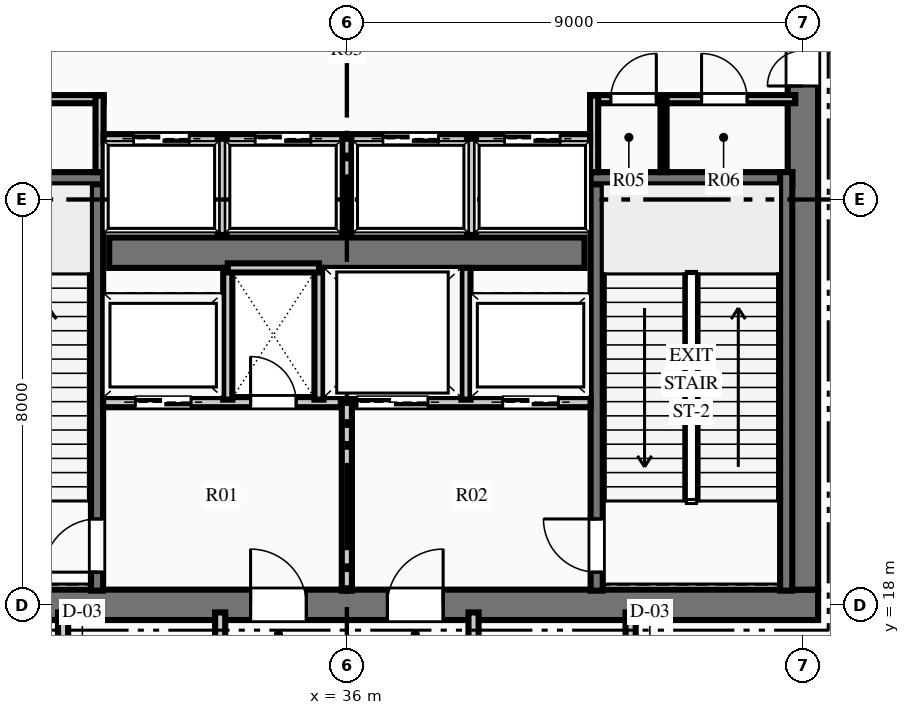
"""IFC4 building model, lengths in metres.
Left out: names, types, materials, properties, quantities, classifications, styles, units other than length and angle.
Written with IfcOpenShell. Run it as: python <this file> out.ifc"""

import sys

from ifc_helpers import new_model, si_unit, direction, frame, frame_2d, origin, place, context, subcontext, project, spatial, rectangle, extrude, element, fill, save


model = new_model("IFC4")
c1 = context("Model", 3, precision=1e-05, world=origin(), true_north=direction((0.0, 1.0)))
c2 = subcontext(c1, "Body", "Model", "MODEL_VIEW")
j1 = project(units=[si_unit("LENGTHUNIT", "METRE"), si_unit("PLANEANGLEUNIT", "RADIAN")], contexts=[c1])
p1 = place(None, origin())
s1 = spatial("IfcSite", under=j1, at=p1, CompositionType="ELEMENT")
p2 = place(p1, origin())
s2 = spatial("IfcBuilding", under=s1, at=p2, CompositionType="ELEMENT")
p3 = place(p2, origin())
s3 = spatial("IfcBuildingStorey", under=s2, at=p3, CompositionType="ELEMENT", Elevation=0.0)
p4 = place(p3, frame((26.7, 18.0, 0.0), z_axis=(0.0, 0.0, 1.0), x_axis=(1.0, 0.0, 0.0)))
e1 = element("IfcWall", 1, at=p4, inside=s3, PredefinedType="SHEAR", context=c2, shape_type="SweptSolid", body=[
    extrude(rectangle(XDim=18.6, YDim=0.6, at=frame_2d((9.3, 0.0))), origin(), (0.0, 0.0, 1.0), 6.0),
])
p5 = place(p4, frame((7.4, 0.0, 0.0)))
e2 = element("IfcOpeningElement", 2, at=p5, cuts=e1, PredefinedType="OPENING", context=c2, shape_type="SweptSolid", body=[
    extrude(rectangle(XDim=1.1, YDim=2.15, at=frame_2d((0.55, 1.075))), frame((0.0, 0.31, 0.0), z_axis=(0.0, -1.0, 0.0), x_axis=(1.0, 0.0, 0.0)), (0.0, 0.0, 1.0), 0.62),
])
p6 = place(p4, frame((10.1, 0.0, 0.0)))
e3 = element("IfcOpeningElement", 3, at=p6, cuts=e1, PredefinedType="OPENING", context=c2, shape_type="SweptSolid", body=[
    extrude(rectangle(XDim=1.1, YDim=2.15, at=frame_2d((0.55, 1.075))), frame((0.0, 0.31, 0.0), z_axis=(0.0, -1.0, 0.0), x_axis=(1.0, 0.0, 0.0)), (0.0, 0.0, 1.0), 0.62),
])
p7 = place(p3, frame((45.0, 18.3, 0.0), z_axis=(0.0, 0.0, 1.0), x_axis=(0.0, 1.0, 0.0)))
e4 = element("IfcWall", 4, at=p7, inside=s3, PredefinedType="SHEAR", context=c2, shape_type="SweptSolid", body=[
    extrude(rectangle(XDim=15.4, YDim=0.6, at=frame_2d((7.7, 0.0))), origin(), (0.0, 0.0, 1.0), 6.0),
])
p8 = place(p7, frame((9.94, 0.0, 0.0)))
e5 = element("IfcOpeningElement", 5, at=p8, cuts=e4, PredefinedType="OPENING", context=c2, shape_type="SweptSolid", body=[
    extrude(rectangle(XDim=1.4, YDim=2.2, at=frame_2d((0.7, 1.1))), frame((0.0, 0.31, 0.0), z_axis=(0.0, -1.0, 0.0), x_axis=(1.0, 0.0, 0.0)), (0.0, 0.0, 1.0), 0.62),
])
p9 = place(p3, frame((31.31, 24.95, 0.0), z_axis=(0.0, 0.0, 1.0), x_axis=(1.0, 0.0, 0.0)))
e6 = element("IfcWall", 6, at=p9, inside=s3, PredefinedType="SHEAR", context=c2, shape_type="SweptSolid", body=[
    extrude(rectangle(XDim=9.38, YDim=0.6, at=frame_2d((4.69, 0.0))), origin(), (0.0, 0.0, 1.0), 6.0),
])
p10 = place(p3, frame((31.07, 18.28, 0.0), z_axis=(0.0, 0.0, 1.0), x_axis=(0.0, 1.0, 0.0)))
e7 = element("IfcWall", 7, at=p10, inside=s3, PredefinedType="SHEAR", context=c2, shape_type="SweptSolid", body=[
    extrude(rectangle(XDim=8.26, YDim=0.24, at=frame_2d((4.13, 0.0))), origin(), (0.0, 0.0, 1.0), 6.0),
])
p11 = place(p10, frame((0.365, 0.0, 0.0)))
e8 = element("IfcOpeningElement", 8, at=p11, cuts=e7, PredefinedType="OPENING", context=c2, shape_type="SweptSolid", body=[
    extrude(rectangle(XDim=1.05, YDim=2.15, at=frame_2d((0.525, 1.075))), frame((0.0, 0.13, 0.0), z_axis=(0.0, -1.0, 0.0), x_axis=(1.0, 0.0, 0.0)), (0.0, 0.0, 1.0), 0.26),
])
p12 = place(p3, frame((27.21, 26.42, 0.0), z_axis=(0.0, 0.0, 1.0), x_axis=(1.0, 0.0, 0.0)))
e9 = element("IfcWall", 9, at=p12, inside=s3, PredefinedType="SHEAR", context=c2, shape_type="SweptSolid", body=[
    extrude(rectangle(XDim=3.98, YDim=0.24, at=frame_2d((1.99, 0.0))), origin(), (0.0, 0.0, 1.0), 6.0),
])
p13 = place(p3, frame((40.93, 18.28, 0.0), z_axis=(0.0, 0.0, 1.0), x_axis=(0.0, 1.0, 0.0)))
e10 = element("IfcWall", 10, at=p13, inside=s3, PredefinedType="SHEAR", context=c2, shape_type="SweptSolid", body=[
    extrude(rectangle(XDim=8.26, YDim=0.24, at=frame_2d((4.13, 0.0))), origin(), (0.0, 0.0, 1.0), 6.0),
])
p14 = place(p13, frame((0.365, 0.0, 0.0)))
e11 = element("IfcOpeningElement", 11, at=p14, cuts=e10, PredefinedType="OPENING", context=c2, shape_type="SweptSolid", body=[
    extrude(rectangle(XDim=1.05, YDim=2.15, at=frame_2d((0.525, 1.075))), frame((0.0, 0.13, 0.0), z_axis=(0.0, -1.0, 0.0), x_axis=(1.0, 0.0, 0.0)), (0.0, 0.0, 1.0), 0.26),
])
p15 = place(p3, frame((40.81, 26.42, 0.0), z_axis=(0.0, 0.0, 1.0), x_axis=(1.0, 0.0, 0.0)))
e12 = element("IfcWall", 12, at=p15, inside=s3, PredefinedType="SHEAR", context=c2, shape_type="SweptSolid", body=[
    extrude(rectangle(XDim=3.98, YDim=0.24, at=frame_2d((1.99, 0.0))), origin(), (0.0, 0.0, 1.0), 6.0),
])
p16 = place(p3, frame((44.67, 18.28, 0.0), z_axis=(0.0, 0.0, 1.0), x_axis=(0.0, 1.0, 0.0)))
e13 = element("IfcWall", 13, at=p16, inside=s3, PredefinedType="SHEAR", context=c2, shape_type="SweptSolid", body=[
    extrude(rectangle(XDim=8.26, YDim=0.24, at=frame_2d((4.13, 0.0))), origin(), (0.0, 0.0, 1.0), 6.0),
])
p17 = place(p3, frame((36.0, 18.28, 0.0), z_axis=(0.0, 0.0, 1.0), x_axis=(0.0, 1.0, 0.0)))
e14 = element("IfcWall", 14, at=p17, inside=s3, PredefinedType="PARTITIONING", context=c2, shape_type="SweptSolid", body=[
    extrude(rectangle(XDim=3.77, YDim=0.2, at=frame_2d((1.885, 0.0))), origin(), (0.0, 0.0, 1.0), 5.67),
])
p18 = place(p3, frame((31.19, 22.0, 0.0), z_axis=(0.0, 0.0, 1.0), x_axis=(1.0, 0.0, 0.0)))
e15 = element("IfcWall", 15, at=p18, inside=s3, PredefinedType="PARTITIONING", context=c2, shape_type="SweptSolid", body=[
    extrude(rectangle(XDim=4.69, YDim=0.2, at=frame_2d((2.345, 0.0))), origin(), (0.0, 0.0, 1.0), 5.67),
])
p19 = place(p18, frame((2.91, 0.0, 0.0)))
e16 = element("IfcOpeningElement", 16, at=p19, cuts=e15, PredefinedType="OPENING", context=c2, shape_type="SweptSolid", body=[
    extrude(rectangle(XDim=0.9, YDim=2.15, at=frame_2d((0.45, 1.075))), frame((0.0, 0.11, 0.0), z_axis=(0.0, -1.0, 0.0), x_axis=(1.0, 0.0, 0.0)), (0.0, 0.0, 1.0), 0.22),
])
p20 = place(p18, frame((0.635, 0.0, 0.0)))
e17 = element("IfcOpeningElement", 17, at=p20, cuts=e15, PredefinedType="OPENING", context=c2, shape_type="SweptSolid", body=[
    extrude(rectangle(XDim=1.1, YDim=2.15, at=frame_2d((0.55, 1.075))), frame((0.0, 0.11, 0.0), z_axis=(0.0, -1.0, 0.0), x_axis=(1.0, 0.0, 0.0)), (0.0, 0.0, 1.0), 0.22),
])
p21 = place(p3, frame((36.12, 22.0, 0.0), z_axis=(0.0, 0.0, 1.0), x_axis=(1.0, 0.0, 0.0)))
e18 = element("IfcWall", 18, at=p21, inside=s3, PredefinedType="PARTITIONING", context=c2, shape_type="SweptSolid", body=[
    extrude(rectangle(XDim=4.69, YDim=0.2, at=frame_2d((2.345, 0.0))), origin(), (0.0, 0.0, 1.0), 5.67),
])
p22 = place(p21, frame((2.955, 0.0, 0.0)))
e19 = element("IfcOpeningElement", 19, at=p22, cuts=e18, PredefinedType="OPENING", context=c2, shape_type="SweptSolid", body=[
    extrude(rectangle(XDim=1.1, YDim=2.15, at=frame_2d((0.55, 1.075))), frame((0.0, 0.11, 0.0), z_axis=(0.0, -1.0, 0.0), x_axis=(1.0, 0.0, 0.0)), (0.0, 0.0, 1.0), 0.22),
])
p23 = place(p21, frame((0.08, 0.0, 0.0)))
e20 = element("IfcOpeningElement", 20, at=p23, cuts=e18, PredefinedType="OPENING", context=c2, shape_type="SweptSolid", body=[
    extrude(rectangle(XDim=1.4, YDim=2.2, at=frame_2d((0.7, 1.1))), frame((0.0, 0.11, 0.0), z_axis=(0.0, -1.0, 0.0), x_axis=(1.0, 0.0, 0.0)), (0.0, 0.0, 1.0), 0.22),
])
for number, where, z_axis, x_axis in (
    (21, (33.65, 22.05, 0.0), (0.0, 0.0, 1.0), (0.0, 1.0, 0.0)),
    (22, (35.45, 22.05, 0.0), (0.0, 0.0, 1.0), (0.0, 1.0, 0.0)),
):
    element("IfcWall", number, at=place(p3, frame(where, z_axis=z_axis, x_axis=x_axis)), inside=s3, PredefinedType="PARTITIONING", context=c2, shape_type="SweptSolid", body=[
        extrude(rectangle(XDim=2.6, YDim=0.18, at=frame_2d((1.3, 0.0))), origin(), (0.0, 0.0, 1.0), 5.67),
    ])
p24 = place(p3, frame((33.65, 24.65, 0.0), z_axis=(0.0, 0.0, 1.0), x_axis=(1.0, 0.0, 0.0)))
e23 = element("IfcWall", 23, at=p24, inside=s3, PredefinedType="PARTITIONING", context=c2, shape_type="SweptSolid", body=[
    extrude(rectangle(XDim=1.8, YDim=0.18, at=frame_2d((0.9, 0.0))), origin(), (0.0, 0.0, 1.0), 5.67),
])
p25 = place(p3, frame((38.35, 22.05, 0.0), z_axis=(0.0, 0.0, 1.0), x_axis=(0.0, 1.0, 0.0)))
e24 = element("IfcWall", 24, at=p25, inside=s3, PredefinedType="PARTITIONING", context=c2, shape_type="SweptSolid", body=[
    extrude(rectangle(XDim=2.6, YDim=0.18, at=frame_2d((1.3, 0.0))), origin(), (0.0, 0.0, 1.0), 5.67),
])
p26 = place(p3, frame((27.15, 27.98, 0.0), z_axis=(0.0, 0.0, 1.0), x_axis=(1.0, 0.0, 0.0)))
e25 = element("IfcWall", 25, at=p26, inside=s3, PredefinedType="PARTITIONING", context=c2, shape_type="SweptSolid", body=[
    extrude(rectangle(XDim=4.05, YDim=0.16, at=frame_2d((2.025, 0.0))), origin(), (0.0, 0.0, 1.0), 5.67),
])
p27 = place(p26, frame((1.625, 0.0, 0.0)))
e26 = element("IfcOpeningElement", 26, at=p27, cuts=e25, PredefinedType="OPENING", context=c2, shape_type="SweptSolid", body=[
    extrude(rectangle(XDim=0.95, YDim=2.15, at=frame_2d((0.475, 1.075))), frame((0.0, 0.09, 0.0), z_axis=(0.0, -1.0, 0.0), x_axis=(1.0, 0.0, 0.0)), (0.0, 0.0, 1.0), 0.18),
])
p28 = place(p3, frame((31.12, 26.54, 0.0), z_axis=(0.0, 0.0, 1.0), x_axis=(0.0, 1.0, 0.0)))
e27 = element("IfcWall", 27, at=p28, inside=s3, PredefinedType="PARTITIONING", context=c2, shape_type="SweptSolid", body=[
    extrude(rectangle(XDim=1.51, YDim=0.16, at=frame_2d((0.755, 0.0))), origin(), (0.0, 0.0, 1.0), 5.67),
])
p29 = place(p3, frame((40.8, 27.98, 0.0), z_axis=(0.0, 0.0, 1.0), x_axis=(1.0, 0.0, 0.0)))
e28 = element("IfcWall", 28, at=p29, inside=s3, PredefinedType="PARTITIONING", context=c2, shape_type="SweptSolid", body=[
    extrude(rectangle(XDim=4.05, YDim=0.16, at=frame_2d((2.025, 0.0))), origin(), (0.0, 0.0, 1.0), 5.67),
])
p30 = place(p29, frame((0.407, 0.0, 0.0)))
e29 = element("IfcOpeningElement", 29, at=p30, cuts=e28, PredefinedType="OPENING", context=c2, shape_type="SweptSolid", body=[
    extrude(rectangle(XDim=0.9, YDim=2.15, at=frame_2d((0.45, 1.075))), frame((0.0, 0.09, 0.0), z_axis=(0.0, -1.0, 0.0), x_axis=(1.0, 0.0, 0.0)), (0.0, 0.0, 1.0), 0.18),
])
p31 = place(p29, frame((2.2, 0.0, 0.0)))
e30 = element("IfcOpeningElement", 30, at=p31, cuts=e28, PredefinedType="OPENING", context=c2, shape_type="SweptSolid", body=[
    extrude(rectangle(XDim=0.9, YDim=2.15, at=frame_2d((0.45, 1.075))), frame((0.0, 0.09, 0.0), z_axis=(0.0, -1.0, 0.0), x_axis=(1.0, 0.0, 0.0)), (0.0, 0.0, 1.0), 0.18),
])
p32 = place(p3, frame((40.88, 26.54, 0.0), z_axis=(0.0, 0.0, 1.0), x_axis=(0.0, 1.0, 0.0)))
e31 = element("IfcWall", 31, at=p32, inside=s3, PredefinedType="PARTITIONING", context=c2, shape_type="SweptSolid", body=[
    extrude(rectangle(XDim=1.51, YDim=0.16, at=frame_2d((0.755, 0.0))), origin(), (0.0, 0.0, 1.0), 5.67),
])
p33 = place(p3, frame((42.25, 26.54, 0.0), z_axis=(0.0, 0.0, 1.0), x_axis=(0.0, 1.0, 0.0)))
e32 = element("IfcWall", 32, at=p33, inside=s3, PredefinedType="PARTITIONING", context=c2, shape_type="SweptSolid", body=[
    extrude(rectangle(XDim=1.44, YDim=0.12, at=frame_2d((0.72, 0.0))), origin(), (0.0, 0.0, 1.0), 5.67),
])
p34 = place(p3, frame((31.2, 27.2, 0.0), z_axis=(0.0, 0.0, 1.0), x_axis=(1.0, 0.0, 0.0)))
e33 = element("IfcWall", 33, at=p34, inside=s3, PredefinedType="PARTITIONING", context=c2, shape_type="SweptSolid", body=[
    extrude(rectangle(XDim=9.6, YDim=0.18, at=frame_2d((4.8, 0.0))), origin(), (0.0, 0.0, 1.0), 5.67),
])
p35 = place(p34, frame((0.59, 0.0, 0.0)))
e34 = element("IfcOpeningElement", 34, at=p35, cuts=e33, PredefinedType="OPENING", context=c2, shape_type="SweptSolid", body=[
    extrude(rectangle(XDim=1.1, YDim=2.15, at=frame_2d((0.55, 1.075))), frame((0.0, 0.1, 0.0), z_axis=(0.0, -1.0, 0.0), x_axis=(1.0, 0.0, 0.0)), (0.0, 0.0, 1.0), 0.2),
])
p36 = place(p34, frame((2.99, 0.0, 0.0)))
e35 = element("IfcOpeningElement", 35, at=p36, cuts=e33, PredefinedType="OPENING", context=c2, shape_type="SweptSolid", body=[
    extrude(rectangle(XDim=1.1, YDim=2.15, at=frame_2d((0.55, 1.075))), frame((0.0, 0.1, 0.0), z_axis=(0.0, -1.0, 0.0), x_axis=(1.0, 0.0, 0.0)), (0.0, 0.0, 1.0), 0.2),
])
p37 = place(p34, frame((5.51, 0.0, 0.0)))
e36 = element("IfcOpeningElement", 36, at=p37, cuts=e33, PredefinedType="OPENING", context=c2, shape_type="SweptSolid", body=[
    extrude(rectangle(XDim=1.1, YDim=2.15, at=frame_2d((0.55, 1.075))), frame((0.0, 0.1, 0.0), z_axis=(0.0, -1.0, 0.0), x_axis=(1.0, 0.0, 0.0)), (0.0, 0.0, 1.0), 0.2),
])
p38 = place(p34, frame((7.91, 0.0, 0.0)))
e37 = element("IfcOpeningElement", 37, at=p38, cuts=e33, PredefinedType="OPENING", context=c2, shape_type="SweptSolid", body=[
    extrude(rectangle(XDim=1.1, YDim=2.15, at=frame_2d((0.55, 1.075))), frame((0.0, 0.1, 0.0), z_axis=(0.0, -1.0, 0.0), x_axis=(1.0, 0.0, 0.0)), (0.0, 0.0, 1.0), 0.2),
])
for number, where, z_axis, x_axis in (
    (38, (33.54, 25.3, 0.0), (0.0, 0.0, 1.0), (0.0, 1.0, 0.0)),
    (39, (36.0, 25.3, 0.0), (0.0, 0.0, 1.0), (0.0, 1.0, 0.0)),
    (40, (38.46, 25.3, 0.0), (0.0, 0.0, 1.0), (0.0, 1.0, 0.0)),
):
    element("IfcWall", number, at=place(p3, frame(where, z_axis=z_axis, x_axis=x_axis)), inside=s3, PredefinedType="PARTITIONING", context=c2, shape_type="SweptSolid", body=[
        extrude(rectangle(XDim=1.9, YDim=0.18, at=frame_2d((0.95, 0.0))), origin(), (0.0, 0.0, 1.0), 5.67),
    ])
p39 = place(p3, frame((30.4, 2.55, 0.0), z_axis=(0.0, 0.0, 1.0), x_axis=(0.0, 1.0, 0.0)))
e41 = element("IfcWall", 41, at=p39, inside=s3, PredefinedType="PARTITIONING", context=c2, shape_type="SweptSolid", body=[
    extrude(rectangle(XDim=15.3, YDim=0.2, at=frame_2d((7.65, 0.0))), origin(), (0.0, 0.0, 1.0), 5.67),
])
p40 = place(p39, frame((13.25, 0.0, 0.0)))
e42 = element("IfcOpeningElement", 42, at=p40, cuts=e41, PredefinedType="OPENING", context=c2, shape_type="SweptSolid", body=[
    extrude(rectangle(XDim=1.4, YDim=2.2, at=frame_2d((0.7, 1.1))), frame((0.0, 0.11, 0.0), z_axis=(0.0, -1.0, 0.0), x_axis=(1.0, 0.0, 0.0)), (0.0, 0.0, 1.0), 0.22),
])
for number, where, z_axis, x_axis in (
    (43, (33.5, 2.55, 0.0), (0.0, 0.0, 1.0), (0.0, 1.0, 0.0)),
    (44, (38.5, 2.55, 0.0), (0.0, 0.0, 1.0), (0.0, 1.0, 0.0)),
):
    element("IfcWall", number, at=place(p3, frame(where, z_axis=z_axis, x_axis=x_axis)), inside=s3, PredefinedType="PARTITIONING", context=c2, shape_type="SweptSolid", body=[
        extrude(rectangle(XDim=15.3, YDim=0.2, at=frame_2d((7.65, 0.0))), origin(), (0.0, 0.0, 1.0), 5.67),
    ])
p41 = place(p3, frame((41.6, 2.55, 0.0), z_axis=(0.0, 0.0, 1.0), x_axis=(0.0, 1.0, 0.0)))
e45 = element("IfcWall", 45, at=p41, inside=s3, PredefinedType="PARTITIONING", context=c2, shape_type="SweptSolid", body=[
    extrude(rectangle(XDim=15.3, YDim=0.2, at=frame_2d((7.65, 0.0))), origin(), (0.0, 0.0, 1.0), 5.67),
])
p42 = place(p41, frame((13.25, 0.0, 0.0)))
e46 = element("IfcOpeningElement", 46, at=p42, cuts=e45, PredefinedType="OPENING", context=c2, shape_type="SweptSolid", body=[
    extrude(rectangle(XDim=1.4, YDim=2.2, at=frame_2d((0.7, 1.1))), frame((0.0, 0.11, 0.0), z_axis=(0.0, -1.0, 0.0), x_axis=(1.0, 0.0, 0.0)), (0.0, 0.0, 1.0), 0.22),
])
p43 = place(p30, origin())
e47 = element("IfcDoor", 47, at=p43, inside=s3, OperationType="SINGLE_SWING_RIGHT", PredefinedType="DOOR", context=c2, shape_type="SweptSolid", body=[
    extrude(rectangle(XDim=0.9, YDim=2.15, at=frame_2d((0.45, 1.075))), frame((0.0, 0.025, 0.0), z_axis=(0.0, -1.0, 0.0), x_axis=(1.0, 0.0, 0.0)), (0.0, 0.0, 1.0), 0.05),
])
fill(e29, e47)
p44 = place(p31, origin())
e48 = element("IfcDoor", 48, at=p44, inside=s3, OperationType="SINGLE_SWING_LEFT", PredefinedType="DOOR", context=c2, shape_type="SweptSolid", body=[
    extrude(rectangle(XDim=0.9, YDim=2.15, at=frame_2d((0.45, 1.075))), frame((0.0, 0.025, 0.0), z_axis=(0.0, -1.0, 0.0), x_axis=(1.0, 0.0, 0.0)), (0.0, 0.0, 1.0), 0.05),
])
fill(e30, e48)
p45 = place(p11, origin())
e49 = element("IfcDoor", 49, at=p45, inside=s3, OperationType="SINGLE_SWING_LEFT", PredefinedType="DOOR", context=c2, shape_type="SweptSolid", body=[
    extrude(rectangle(XDim=1.05, YDim=2.15, at=frame_2d((0.525, 1.075))), frame((0.0, 0.025, 0.0), z_axis=(0.0, -1.0, 0.0), x_axis=(1.0, 0.0, 0.0)), (0.0, 0.0, 1.0), 0.05),
])
fill(e8, e49)
p46 = place(p14, origin())
e50 = element("IfcDoor", 50, at=p46, inside=s3, OperationType="SINGLE_SWING_RIGHT", PredefinedType="DOOR", context=c2, shape_type="SweptSolid", body=[
    extrude(rectangle(XDim=1.05, YDim=2.15, at=frame_2d((0.525, 1.075))), frame((0.0, 0.025, 0.0), z_axis=(0.0, -1.0, 0.0), x_axis=(1.0, 0.0, 0.0)), (0.0, 0.0, 1.0), 0.05),
])
fill(e11, e50)
p47 = place(p5, origin())
e51 = element("IfcDoor", 51, at=p47, inside=s3, OperationType="SINGLE_SWING_LEFT", PredefinedType="DOOR", context=c2, shape_type="SweptSolid", body=[
    extrude(rectangle(XDim=1.1, YDim=2.15, at=frame_2d((0.55, 1.075))), frame((0.0, 0.025, 0.0), z_axis=(0.0, -1.0, 0.0), x_axis=(1.0, 0.0, 0.0)), (0.0, 0.0, 1.0), 0.05),
])
fill(e2, e51)
p48 = place(p6, origin())
e52 = element("IfcDoor", 52, at=p48, inside=s3, OperationType="SINGLE_SWING_RIGHT", PredefinedType="DOOR", context=c2, shape_type="SweptSolid", body=[
    extrude(rectangle(XDim=1.1, YDim=2.15, at=frame_2d((0.55, 1.075))), frame((0.0, 0.025, 0.0), z_axis=(0.0, -1.0, 0.0), x_axis=(1.0, 0.0, 0.0)), (0.0, 0.0, 1.0), 0.05),
])
fill(e3, e52)
p49 = place(p19, origin())
e53 = element("IfcDoor", 53, at=p49, inside=s3, OperationType="SINGLE_SWING_LEFT", PredefinedType="DOOR", context=c2, shape_type="SweptSolid", body=[
    extrude(rectangle(XDim=0.9, YDim=2.15, at=frame_2d((0.45, 1.075))), frame((0.0, 0.025, 0.0), z_axis=(0.0, -1.0, 0.0), x_axis=(1.0, 0.0, 0.0)), (0.0, 0.0, 1.0), 0.05),
])
fill(e16, e53)
p50 = place(p8, origin())
e54 = element("IfcDoor", 54, at=p50, inside=s3, OperationType="DOUBLE_DOOR_SINGLE_SWING", PredefinedType="DOOR", context=c2, shape_type="SweptSolid", body=[
    extrude(rectangle(XDim=1.4, YDim=2.2, at=frame_2d((0.7, 1.1))), frame((0.0, 0.025, 0.0), z_axis=(0.0, -1.0, 0.0), x_axis=(1.0, 0.0, 0.0)), (0.0, 0.0, 1.0), 0.05),
])
fill(e5, e54)
p51 = place(p35, origin())
e55 = element("IfcDoor", 55, at=p51, inside=s3, OperationType="SLIDING_TO_LEFT", PredefinedType="DOOR", context=c2, shape_type="SweptSolid", body=[
    extrude(rectangle(XDim=1.1, YDim=2.15, at=frame_2d((0.55, 1.075))), frame((0.0, 0.025, 0.0), z_axis=(0.0, -1.0, 0.0), x_axis=(1.0, 0.0, 0.0)), (0.0, 0.0, 1.0), 0.05),
])
fill(e34, e55)
p52 = place(p36, origin())
e56 = element("IfcDoor", 56, at=p52, inside=s3, OperationType="SLIDING_TO_LEFT", PredefinedType="DOOR", context=c2, shape_type="SweptSolid", body=[
    extrude(rectangle(XDim=1.1, YDim=2.15, at=frame_2d((0.55, 1.075))), frame((0.0, 0.025, 0.0), z_axis=(0.0, -1.0, 0.0), x_axis=(1.0, 0.0, 0.0)), (0.0, 0.0, 1.0), 0.05),
])
fill(e35, e56)
p53 = place(p37, origin())
e57 = element("IfcDoor", 57, at=p53, inside=s3, OperationType="SLIDING_TO_LEFT", PredefinedType="DOOR", context=c2, shape_type="SweptSolid", body=[
    extrude(rectangle(XDim=1.1, YDim=2.15, at=frame_2d((0.55, 1.075))), frame((0.0, 0.025, 0.0), z_axis=(0.0, -1.0, 0.0), x_axis=(1.0, 0.0, 0.0)), (0.0, 0.0, 1.0), 0.05),
])
fill(e36, e57)
p54 = place(p38, origin())
e58 = element("IfcDoor", 58, at=p54, inside=s3, OperationType="SLIDING_TO_LEFT", PredefinedType="DOOR", context=c2, shape_type="SweptSolid", body=[
    extrude(rectangle(XDim=1.1, YDim=2.15, at=frame_2d((0.55, 1.075))), frame((0.0, 0.025, 0.0), z_axis=(0.0, -1.0, 0.0), x_axis=(1.0, 0.0, 0.0)), (0.0, 0.0, 1.0), 0.05),
])
fill(e37, e58)
p55 = place(p20, origin())
e59 = element("IfcDoor", 59, at=p55, inside=s3, OperationType="SLIDING_TO_LEFT", PredefinedType="DOOR", context=c2, shape_type="SweptSolid", body=[
    extrude(rectangle(XDim=1.1, YDim=2.15, at=frame_2d((0.55, 1.075))), frame((0.0, 0.025, 0.0), z_axis=(0.0, -1.0, 0.0), x_axis=(1.0, 0.0, 0.0)), (0.0, 0.0, 1.0), 0.05),
])
fill(e17, e59)
p56 = place(p22, origin())
e60 = element("IfcDoor", 60, at=p56, inside=s3, OperationType="SLIDING_TO_LEFT", PredefinedType="DOOR", context=c2, shape_type="SweptSolid", body=[
    extrude(rectangle(XDim=1.1, YDim=2.15, at=frame_2d((0.55, 1.075))), frame((0.0, 0.025, 0.0), z_axis=(0.0, -1.0, 0.0), x_axis=(1.0, 0.0, 0.0)), (0.0, 0.0, 1.0), 0.05),
])
fill(e19, e60)
p57 = place(p23, origin())
e61 = element("IfcDoor", 61, at=p57, inside=s3, OperationType="SLIDING_TO_LEFT", PredefinedType="DOOR", context=c2, shape_type="SweptSolid", body=[
    extrude(rectangle(XDim=1.4, YDim=2.2, at=frame_2d((0.7, 1.1))), frame((0.0, 0.025, 0.0), z_axis=(0.0, -1.0, 0.0), x_axis=(1.0, 0.0, 0.0)), (0.0, 0.0, 1.0), 0.05),
])
fill(e20, e61)
save(model, sys.argv[1])
